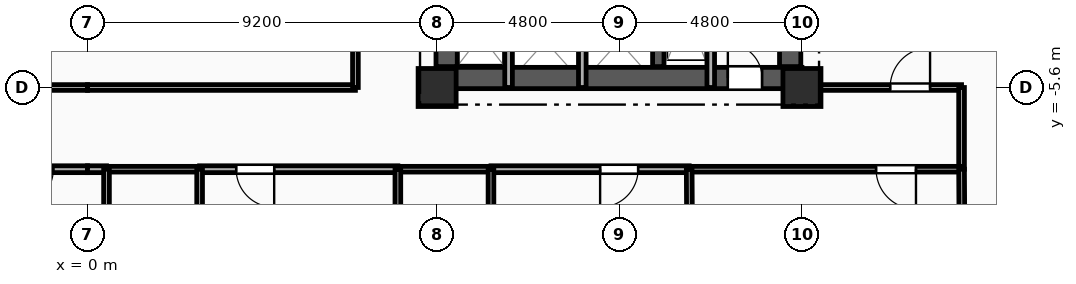
"""IFC4 building model, lengths in metres.
Left out: names, types, materials, properties, quantities, classifications, styles, units other than length and angle.
Written with IfcOpenShell. Run it as: python <this file> out.ifc"""

import sys

from ifc_helpers import new_model, si_unit, direction, frame, frame_2d, origin, origin_2d, place, context, subcontext, project, spatial, rectangle, extrude, element, fill, save


model = new_model("IFC4")
c1 = context("Model", 3, precision=1e-05, world=origin(), true_north=direction((0.0, 1.0)))
c2 = subcontext(c1, "Body", "Model", "MODEL_VIEW")
j1 = project(units=[si_unit("LENGTHUNIT", "METRE"), si_unit("PLANEANGLEUNIT", "RADIAN")], contexts=[c1])
p1 = place(None, origin())
s1 = spatial("IfcSite", under=j1, at=p1, CompositionType="ELEMENT")
p2 = place(p1, origin())
s2 = spatial("IfcBuilding", under=s1, at=p2, CompositionType="ELEMENT")
p3 = place(p2, frame((0.0, 0.0, 92.4)))
s3 = spatial("IfcBuildingStorey", under=s2, at=p3, CompositionType="ELEMENT", Elevation=92.4)
for number, where, z_axis, x_axis in (
    (1, (9.2, -5.6, 0.0), (0.0, 0.0, 1.0), (1.0, 0.0, 0.0)),
    (2, (18.8, -5.6, 0.0), (0.0, 0.0, 1.0), (1.0, 0.0, 0.0)),
):
    element("IfcColumn", number, at=place(p3, frame(where, z_axis=z_axis, x_axis=x_axis)), inside=s3, PredefinedType="COLUMN", context=c2, shape_type="SweptSolid", body=[
        extrude(rectangle(XDim=1.0, YDim=1.0, at=origin_2d()), origin(), (0.0, 0.0, 1.0), 3.35),
    ])
p4 = place(p3, frame((9.2, -5.35, 0.0), z_axis=(0.0, 0.0, 1.0), x_axis=(1.0, 0.0, 0.0)))
e3 = element("IfcWall", 3, at=p4, inside=s3, PredefinedType="SHEAR", context=c2, shape_type="SweptSolid", body=[
    extrude(rectangle(XDim=9.6, YDim=0.56, at=frame_2d((4.8, 0.0))), origin(), (0.0, 0.0, 1.0), 3.045),
])
p5 = place(p4, frame((7.65, 0.0, 0.0)))
e4 = element("IfcOpeningElement", 4, at=p5, cuts=e3, PredefinedType="OPENING", context=c2, shape_type="SweptSolid", body=[
    extrude(rectangle(XDim=0.9, YDim=2.1, at=frame_2d((0.45, 1.05))), frame((0.0, 0.29, 0.0), z_axis=(0.0, -1.0, 0.0), x_axis=(1.0, 0.0, 0.0)), (0.0, 0.0, 1.0), 0.58),
])
p6 = place(p3, frame((9.45, -5.05, 0.0), z_axis=(0.0, 0.0, 1.0), x_axis=(0.0, 1.0, 0.0)))
e5 = element("IfcWall", 5, at=p6, inside=s3, PredefinedType="SHEAR", context=c2, shape_type="SweptSolid", body=[
    extrude(rectangle(XDim=10.1, YDim=0.56, at=frame_2d((5.05, 0.0))), origin(), (0.0, 0.0, 1.0), 3.045),
])
p7 = place(p6, frame((7.15, 0.0, 0.0)))
e6 = element("IfcOpeningElement", 6, at=p7, cuts=e5, PredefinedType="OPENING", context=c2, shape_type="SweptSolid", body=[
    extrude(rectangle(XDim=0.9, YDim=2.1, at=frame_2d((0.45, 1.05))), frame((0.0, 0.29, 0.0), z_axis=(0.0, -1.0, 0.0), x_axis=(1.0, 0.0, 0.0)), (0.0, 0.0, 1.0), 0.58),
])
p8 = place(p6, frame((2.4, 0.0, 0.0)))
e7 = element("IfcOpeningElement", 7, at=p8, cuts=e5, PredefinedType="OPENING", context=c2, shape_type="SweptSolid", body=[
    extrude(rectangle(XDim=1.2, YDim=2.15, at=frame_2d((0.6, 1.075))), frame((0.0, 0.29, 0.0), z_axis=(0.0, -1.0, 0.0), x_axis=(1.0, 0.0, 0.0)), (0.0, 0.0, 1.0), 0.58),
])
p9 = place(p3, frame((18.49, -5.05, 0.0), z_axis=(0.0, 0.0, 1.0), x_axis=(0.0, 1.0, 0.0)))
e8 = element("IfcWall", 8, at=p9, inside=s3, PredefinedType="SHEAR", context=c2, shape_type="SweptSolid", body=[
    extrude(rectangle(XDim=10.1, YDim=0.56, at=frame_2d((5.05, 0.0))), origin(), (0.0, 0.0, 1.0), 3.045),
])
p10 = place(p3, frame((15.02, -5.05, 0.0), z_axis=(0.0, 0.0, 1.0), x_axis=(0.0, 1.0, 0.0)))
e9 = element("IfcWall", 9, at=p10, inside=s3, PredefinedType="SHEAR", context=c2, shape_type="SweptSolid", body=[
    extrude(rectangle(XDim=10.1, YDim=0.3, at=frame_2d((5.05, 0.0))), origin(), (0.0, 0.0, 1.0), 3.045),
])
p11 = place(p3, frame((16.4, -2.11, 0.0), z_axis=(0.0, 0.0, 1.0), x_axis=(0.0, -1.0, 0.0)))
e10 = element("IfcWall", 10, at=p11, inside=s3, PredefinedType="PARTITIONING", context=c2, shape_type="SweptSolid", body=[
    extrude(rectangle(XDim=3.49, YDim=0.2, at=frame_2d((1.745, 0.0))), origin(), (0.0, 0.0, 1.0), 3.045),
])
for number, where, z_axis, x_axis in (
    (11, (11.08, -5.6, 0.0), (0.0, 0.0, 1.0), (0.0, 1.0, 0.0)),
    (12, (13.02, -5.6, 0.0), (0.0, 0.0, 1.0), (0.0, 1.0, 0.0)),
):
    element("IfcWall", number, at=place(p3, frame(where, z_axis=z_axis, x_axis=x_axis)), inside=s3, PredefinedType="PARTITIONING", context=c2, shape_type="SweptSolid", body=[
        extrude(rectangle(XDim=2.25, YDim=0.2, at=frame_2d((1.125, 0.0))), origin(), (0.0, 0.0, 1.0), 3.045),
    ])
p12 = place(p3, frame((0.0, -7.75, 0.0), z_axis=(0.0, 0.0, 1.0), x_axis=(-1.0, 0.0, 0.0)))
e13 = element("IfcWall", 13, at=p12, inside=s3, PredefinedType="PARTITIONING", context=c2, shape_type="SweptSolid", body=[
    extrude(rectangle(XDim=4.717, YDim=0.18, at=frame_2d((2.358, 0.0))), origin(), (0.0, 0.0, 1.0), 3.045),
])
p13 = place(p12, frame((0.9, 0.0, 0.0)))
e14 = element("IfcOpeningElement", 14, at=p13, cuts=e13, PredefinedType="OPENING", context=c2, shape_type="SweptSolid", body=[
    extrude(rectangle(XDim=1.0, YDim=2.15, at=frame_2d((0.5, 1.075))), frame((0.0, 0.1, 0.0), z_axis=(0.0, -1.0, 0.0), x_axis=(1.0, 0.0, 0.0)), (0.0, 0.0, 1.0), 0.2),
])
p14 = place(p3, frame((-7.05, -5.6, 0.0), z_axis=(0.0, 0.0, 1.0), x_axis=(1.0, 0.0, 0.0)))
e15 = element("IfcWall", 15, at=p14, inside=s3, PredefinedType="PARTITIONING", context=c2, shape_type="SweptSolid", body=[
    extrude(rectangle(XDim=7.05, YDim=0.15, at=frame_2d((3.525, 0.0))), origin(), (0.0, 0.0, 1.0), 2.53),
])
p15 = place(p14, frame((4.815, 0.0, 0.0)))
e16 = element("IfcOpeningElement", 16, at=p15, cuts=e15, PredefinedType="OPENING", context=c2, shape_type="SweptSolid", body=[
    extrude(rectangle(XDim=1.05, YDim=2.15, at=frame_2d((0.525, 1.075))), frame((0.0, 0.085, 0.0), z_axis=(0.0, -1.0, 0.0), x_axis=(1.0, 0.0, 0.0)), (0.0, 0.0, 1.0), 0.17),
])
p16 = place(p3, frame((18.8, -5.6, 0.0), z_axis=(0.0, 0.0, 1.0), x_axis=(1.0, 0.0, 0.0)))
e17 = element("IfcWall", 17, at=p16, inside=s3, PredefinedType="PARTITIONING", context=c2, shape_type="SweptSolid", body=[
    extrude(rectangle(XDim=4.2, YDim=0.15, at=frame_2d((2.1, 0.0))), origin(), (0.0, 0.0, 1.0), 2.53),
])
p17 = place(p16, frame((2.321, 0.0, 0.0)))
e18 = element("IfcOpeningElement", 18, at=p17, cuts=e17, PredefinedType="OPENING", context=c2, shape_type="SweptSolid", body=[
    extrude(rectangle(XDim=1.05, YDim=2.15, at=frame_2d((0.525, 1.075))), frame((0.0, 0.085, 0.0), z_axis=(0.0, -1.0, 0.0), x_axis=(1.0, 0.0, 0.0)), (0.0, 0.0, 1.0), 0.17),
])
p18 = place(p3, frame((23.0, -5.6, 0.0), z_axis=(0.0, 0.0, 1.0), x_axis=(0.0, -1.0, 0.0)))
e19 = element("IfcWall", 19, at=p18, inside=s3, PredefinedType="PARTITIONING", context=c2, shape_type="SweptSolid", body=[
    extrude(rectangle(XDim=2.15, YDim=0.15, at=frame_2d((1.075, 0.0))), origin(), (0.0, 0.0, 1.0), 3.045),
])
p19 = place(p3, frame((0.5, -7.75, 0.0), z_axis=(0.0, 0.0, 1.0), x_axis=(-1.0, 0.0, 0.0)))
e20 = element("IfcWall", 20, at=p19, inside=s3, PredefinedType="PARTITIONING", context=c2, shape_type="SweptSolid", body=[
    extrude(rectangle(XDim=0.5, YDim=0.18, at=frame_2d((0.25, 0.0))), origin(), (0.0, 0.0, 1.0), 3.045),
])
p20 = place(p3, frame((8.167, -7.75, 0.0), z_axis=(0.0, 0.0, 1.0), x_axis=(-1.0, 0.0, 0.0)))
e21 = element("IfcWall", 21, at=p20, inside=s3, PredefinedType="PARTITIONING", context=c2, shape_type="SweptSolid", body=[
    extrude(rectangle(XDim=5.217, YDim=0.18, at=frame_2d((2.608, 0.0))), origin(), (0.0, 0.0, 1.0), 3.045),
])
p21 = place(p20, frame((3.255, 0.0, 0.0)))
e22 = element("IfcOpeningElement", 22, at=p21, cuts=e21, PredefinedType="OPENING", context=c2, shape_type="SweptSolid", body=[
    extrude(rectangle(XDim=1.0, YDim=2.15, at=frame_2d((0.5, 1.075))), frame((0.0, 0.1, 0.0), z_axis=(0.0, -1.0, 0.0), x_axis=(1.0, 0.0, 0.0)), (0.0, 0.0, 1.0), 0.2),
])
p22 = place(p3, frame((2.95, -7.75, 0.0), z_axis=(0.0, 0.0, 1.0), x_axis=(-1.0, 0.0, 0.0)))
e23 = element("IfcWall", 23, at=p22, inside=s3, PredefinedType="PLUMBINGWALL", context=c2, shape_type="SweptSolid", body=[
    extrude(rectangle(XDim=2.45, YDim=0.15, at=frame_2d((1.225, 0.0))), origin(), (0.0, 0.0, 1.0), 3.045),
])
p23 = place(p3, frame((15.833, -7.75, 0.0), z_axis=(0.0, 0.0, 1.0), x_axis=(-1.0, 0.0, 0.0)))
e24 = element("IfcWall", 24, at=p23, inside=s3, PredefinedType="PARTITIONING", context=c2, shape_type="SweptSolid", body=[
    extrude(rectangle(XDim=5.216, YDim=0.18, at=frame_2d((2.608, 0.0))), origin(), (0.0, 0.0, 1.0), 3.045),
])
p24 = place(p23, frame((1.344, 0.0, 0.0)))
e25 = element("IfcOpeningElement", 25, at=p24, cuts=e24, PredefinedType="OPENING", context=c2, shape_type="SweptSolid", body=[
    extrude(rectangle(XDim=1.0, YDim=2.15, at=frame_2d((0.5, 1.075))), frame((0.0, 0.1, 0.0), z_axis=(0.0, -1.0, 0.0), x_axis=(1.0, 0.0, 0.0)), (0.0, 0.0, 1.0), 0.2),
])
p25 = place(p3, frame((10.617, -7.75, 0.0), z_axis=(0.0, 0.0, 1.0), x_axis=(-1.0, 0.0, 0.0)))
e26 = element("IfcWall", 26, at=p25, inside=s3, PredefinedType="PLUMBINGWALL", context=c2, shape_type="SweptSolid", body=[
    extrude(rectangle(XDim=2.45, YDim=0.15, at=frame_2d((1.225, 0.0))), origin(), (0.0, 0.0, 1.0), 3.045),
])
p26 = place(p3, frame((23.0, -7.75, 0.0), z_axis=(0.0, 0.0, 1.0), x_axis=(-1.0, 0.0, 0.0)))
e27 = element("IfcWall", 27, at=p26, inside=s3, PredefinedType="PARTITIONING", context=c2, shape_type="SweptSolid", body=[
    extrude(rectangle(XDim=7.167, YDim=0.15, at=frame_2d((3.583, 0.0))), origin(), (0.0, 0.0, 1.0), 3.045),
])
p27 = place(p26, frame((1.2, 0.0, 0.0)))
e28 = element("IfcOpeningElement", 28, at=p27, cuts=e27, PredefinedType="OPENING", context=c2, shape_type="SweptSolid", body=[
    extrude(rectangle(XDim=1.05, YDim=2.15, at=frame_2d((0.525, 1.075))), frame((0.0, 0.085, 0.0), z_axis=(0.0, -1.0, 0.0), x_axis=(1.0, 0.0, 0.0)), (0.0, 0.0, 1.0), 0.17),
])
p28 = place(p3, frame((0.0, -5.6, 0.0), z_axis=(0.0, 0.0, 1.0), x_axis=(1.0, 0.0, 0.0)))
e29 = element("IfcWall", 29, at=p28, inside=s3, PredefinedType="PARTITIONING", context=c2, shape_type="SweptSolid", body=[
    extrude(rectangle(XDim=7.05, YDim=0.15, at=frame_2d((3.525, 0.0))), origin(), (0.0, 0.0, 1.0), 2.53),
])
p29 = place(p3, frame((7.05, -5.6, 0.0), z_axis=(0.0, 0.0, 1.0), x_axis=(0.0, 1.0, 0.0)))
e30 = element("IfcWall", 30, at=p29, inside=s3, PredefinedType="PARTITIONING", context=c2, shape_type="SweptSolid", body=[
    extrude(rectangle(XDim=7.05, YDim=0.15, at=frame_2d((3.525, 0.0))), origin(), (0.0, 0.0, 1.0), 3.045),
])
p30 = place(p3, frame((23.044, -14.749, 0.0), z_axis=(0.0, 0.0, 1.0), x_axis=(-0.006278653971, 0.999980289058, 0.0)))
e31 = element("IfcWall", 31, at=p30, inside=s3, PredefinedType="PARTITIONING", context=c2, shape_type="SweptSolid", body=[
    extrude(rectangle(XDim=6.999, YDim=0.15, at=frame_2d((3.5, 0.0))), origin(), (0.0, 0.0, 1.0), 3.045),
])
for number, where, z_axis, x_axis in (
    (32, (0.5, -7.75, 0.0), (0.0, 0.0, 1.0), (0.0, -1.0, 0.0)),
    (33, (2.95, -9.9, 0.0), (0.0, 0.0, 1.0), (0.0, 1.0, 0.0)),
    (34, (8.167, -7.75, 0.0), (0.0, 0.0, 1.0), (0.0, -1.0, 0.0)),
):
    element("IfcWall", number, at=place(p3, frame(where, z_axis=z_axis, x_axis=x_axis)), inside=s3, PredefinedType="PLUMBINGWALL", context=c2, shape_type="SweptSolid", body=[
        extrude(rectangle(XDim=2.15, YDim=0.15, at=frame_2d((1.075, 0.0))), origin(), (0.0, 0.0, 1.0), 3.045),
    ])
p31 = place(p3, frame((10.617, -9.9, 0.0), z_axis=(0.0, 0.0, 1.0), x_axis=(0.0, 1.0, 0.0)))
e35 = element("IfcWall", 35, at=p31, inside=s3, PredefinedType="PLUMBINGWALL", context=c2, shape_type="SweptSolid", body=[
    extrude(rectangle(XDim=2.15, YDim=0.15, at=frame_2d((1.075, 0.0))), origin(), (0.0, 0.0, 1.0), 2.53),
])
p32 = place(p3, frame((15.833, -7.75, 0.0), z_axis=(0.0, 0.0, 1.0), x_axis=(0.005668486116, -0.999983934004, 0.0)))
e36 = element("IfcWall", 36, at=p32, inside=s3, PredefinedType="PARTITIONING", context=c2, shape_type="SweptSolid", body=[
    extrude(rectangle(XDim=7.753, YDim=0.15, at=frame_2d((3.876, 0.0))), origin(), (0.0, 0.0, 1.0), 3.045),
])
p33 = place(p5, origin())
e37 = element("IfcDoor", 37, at=p33, inside=s3, OperationType="SINGLE_SWING_LEFT", PredefinedType="DOOR", context=c2, shape_type="SweptSolid", body=[
    extrude(rectangle(XDim=0.9, YDim=2.1, at=frame_2d((0.45, 1.05))), frame((0.0, 0.025, 0.0), z_axis=(0.0, -1.0, 0.0), x_axis=(1.0, 0.0, 0.0)), (0.0, 0.0, 1.0), 0.05),
])
fill(e4, e37)
p34 = place(p13, origin())
e38 = element("IfcDoor", 38, at=p34, inside=s3, OperationType="SINGLE_SWING_RIGHT", PredefinedType="DOOR", context=c2, shape_type="SweptSolid", body=[
    extrude(rectangle(XDim=1.0, YDim=2.15, at=frame_2d((0.5, 1.075))), frame((0.0, 0.025, 0.0), z_axis=(0.0, -1.0, 0.0), x_axis=(1.0, 0.0, 0.0)), (0.0, 0.0, 1.0), 0.05),
])
fill(e14, e38)
p35 = place(p17, origin())
e39 = element("IfcDoor", 39, at=p35, inside=s3, OperationType="SINGLE_SWING_RIGHT", PredefinedType="DOOR", context=c2, shape_type="SweptSolid", body=[
    extrude(rectangle(XDim=1.05, YDim=2.15, at=frame_2d((0.525, 1.075))), frame((0.0, 0.025, 0.0), z_axis=(0.0, -1.0, 0.0), x_axis=(1.0, 0.0, 0.0)), (0.0, 0.0, 1.0), 0.05),
])
fill(e18, e39)
p36 = place(p21, origin())
e40 = element("IfcDoor", 40, at=p36, inside=s3, OperationType="SINGLE_SWING_LEFT", PredefinedType="DOOR", context=c2, shape_type="SweptSolid", body=[
    extrude(rectangle(XDim=1.0, YDim=2.15, at=frame_2d((0.5, 1.075))), frame((0.0, 0.025, 0.0), z_axis=(0.0, -1.0, 0.0), x_axis=(1.0, 0.0, 0.0)), (0.0, 0.0, 1.0), 0.05),
])
fill(e22, e40)
p37 = place(p24, origin())
e41 = element("IfcDoor", 41, at=p37, inside=s3, OperationType="SINGLE_SWING_RIGHT", PredefinedType="DOOR", context=c2, shape_type="SweptSolid", body=[
    extrude(rectangle(XDim=1.0, YDim=2.15, at=frame_2d((0.5, 1.075))), frame((0.0, 0.025, 0.0), z_axis=(0.0, -1.0, 0.0), x_axis=(1.0, 0.0, 0.0)), (0.0, 0.0, 1.0), 0.05),
])
fill(e25, e41)
p38 = place(p27, origin())
e42 = element("IfcDoor", 42, at=p38, inside=s3, OperationType="SINGLE_SWING_LEFT", PredefinedType="DOOR", context=c2, shape_type="SweptSolid", body=[
    extrude(rectangle(XDim=1.05, YDim=2.15, at=frame_2d((0.525, 1.075))), frame((0.0, 0.025, 0.0), z_axis=(0.0, -1.0, 0.0), x_axis=(1.0, 0.0, 0.0)), (0.0, 0.0, 1.0), 0.05),
])
fill(e28, e42)
save(model, sys.argv[1])
